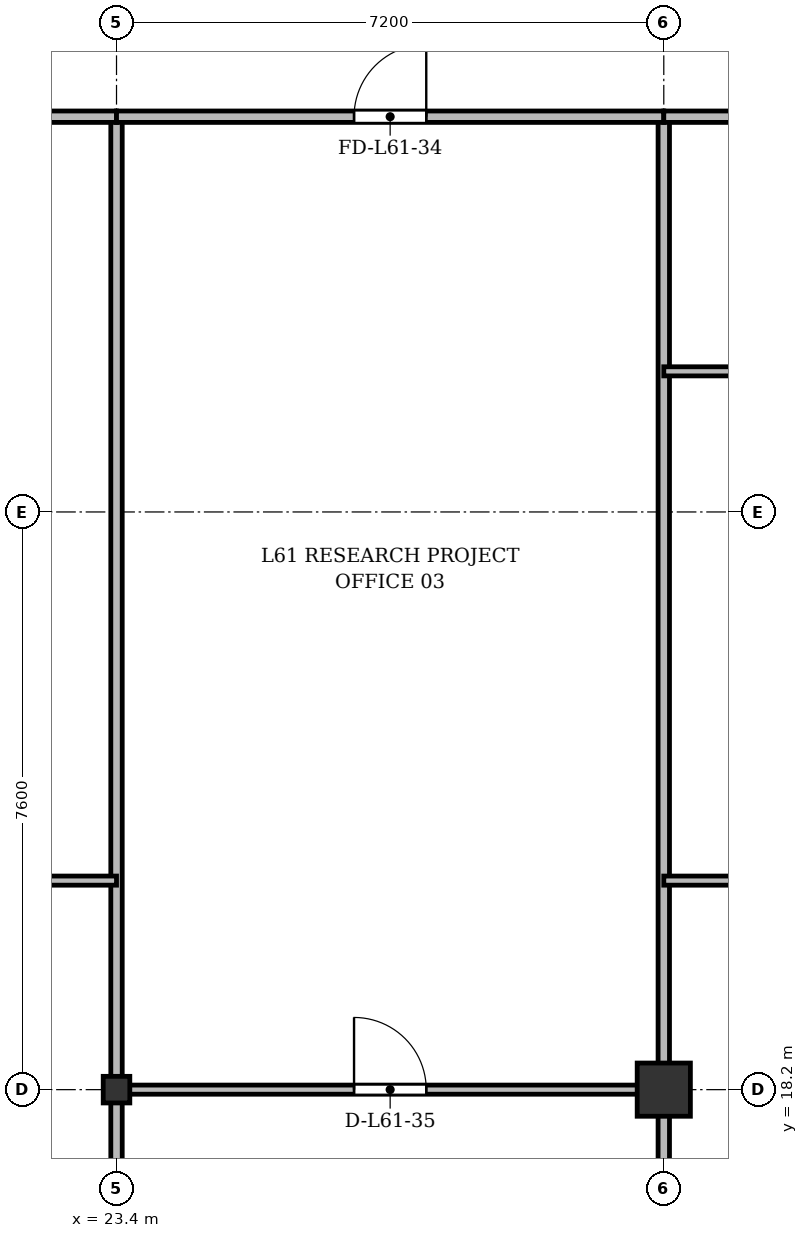
"""IFC4 building model, lengths in metres.
Left out: names, types, materials, properties, quantities, classifications, styles, units other than length and angle.
Written with IfcOpenShell. Run it as: python <this file> out.ifc"""

import sys

from ifc_helpers import new_model, si_unit, direction, frame, frame_2d, origin, origin_2d, place, context, subcontext, project, spatial, rectangle, i_section, extrude, source, transform, mapped, element, fill, save


model = new_model("IFC4")
c1 = context("Model", 3, precision=1e-05, world=origin(), true_north=direction((0.0, 1.0)))
c2 = subcontext(c1, "Body", "Model", "MODEL_VIEW")
j1 = project(units=[si_unit("LENGTHUNIT", "METRE"), si_unit("PLANEANGLEUNIT", "RADIAN")], contexts=[c1])
p1 = place(None, origin())
s1 = spatial("IfcSite", under=j1, at=p1, CompositionType="ELEMENT")
p2 = place(p1, origin())
s2 = spatial("IfcBuilding", under=s1, at=p2, CompositionType="ELEMENT")
p3 = place(p2, frame((0.0, 0.0, 233.7)))
s3 = spatial("IfcBuildingStorey", under=s2, at=p3, CompositionType="ELEMENT", Elevation=233.7)
m1 = source(origin(), c2, "Body", "SweptSolid", [
    extrude(i_section(OverallWidth=0.35, OverallDepth=0.35, WebThickness=0.018, FlangeThickness=0.028, at=origin_2d()), origin(), (0.0, 0.0, 1.0), 3.6),
])
p4 = place(p3, frame((23.4, 18.2, 0.0), z_axis=(0.0, 0.0, 1.0), x_axis=(1.0, 0.0, 0.0)))
e1 = element("IfcColumn", 1, at=p4, inside=s3, PredefinedType="COLUMN", context=c2, shape_type="MappedRepresentation", body=[
    mapped(m1, transform((0.0, 0.0, 0.0), x_axis=(1.0, 0.0, 0.0), y_axis=(0.0, 1.0, 0.0), z_axis=(0.0, 0.0, 1.0), scale=1.0)),
])
m2 = source(origin(), c2, "Body", "SweptSolid", [
    extrude(rectangle(XDim=0.7, YDim=0.7, at=origin_2d()), origin(), (0.0, 0.0, 1.0), 3.6),
])
p5 = place(p3, frame((30.6, 18.2, 0.0), z_axis=(0.0, 0.0, 1.0), x_axis=(1.0, 0.0, 0.0)))
e2 = element("IfcColumn", 2, at=p5, inside=s3, PredefinedType="COLUMN", context=c2, shape_type="MappedRepresentation", body=[
    mapped(m2, transform((0.0, 0.0, 0.0), x_axis=(1.0, 0.0, 0.0), y_axis=(0.0, 1.0, 0.0), z_axis=(0.0, 0.0, 1.0), scale=1.0)),
])
for number, where, z_axis, x_axis in (
    (3, (23.4, 3.625, 0.0), (0.0, 0.0, 1.0), (0.0, 1.0, 0.0)),
    (4, (30.6, 3.625, 0.0), (0.0, 0.0, 1.0), (0.0, 1.0, 0.0)),
):
    element("IfcWall", number, at=place(p3, frame(where, z_axis=z_axis, x_axis=x_axis)), inside=s3, PredefinedType="PARTITIONING", context=c2, shape_type="SweptSolid", body=[
        extrude(rectangle(XDim=27.375, YDim=0.15, at=frame_2d((13.688, 0.0))), origin(), (0.0, 0.0, 1.0), 2.86),
    ])
p6 = place(p3, frame((15.6, 20.95, 0.0), z_axis=(0.0, 0.0, 1.0), x_axis=(1.0, 0.0, 0.0)))
e5 = element("IfcWall", 5, at=p6, inside=s3, PredefinedType="PARTITIONING", context=c2, shape_type="SweptSolid", body=[
    extrude(rectangle(XDim=7.8, YDim=0.12, at=frame_2d((3.9, 0.0))), origin(), (0.0, 0.0, 1.0), 2.86),
])
p7 = place(p6, frame((3.333, 0.0, 0.0)))
e6 = element("IfcOpeningElement", 6, at=p7, cuts=e5, PredefinedType="OPENING", context=c2, shape_type="SweptSolid", body=[
    extrude(rectangle(XDim=0.95, YDim=2.15, at=frame_2d((0.475, 1.075))), frame((0.0, 0.07, 0.0), z_axis=(0.0, -1.0, 0.0), x_axis=(1.0, 0.0, 0.0)), (0.0, 0.0, 1.0), 0.14),
])
p8 = place(p3, frame((15.6, 31.0, 0.0), z_axis=(0.0, 0.0, 1.0), x_axis=(1.0, 0.0, 0.0)))
e7 = element("IfcWall", 7, at=p8, inside=s3, PredefinedType="PARTITIONING", context=c2, shape_type="SweptSolid", body=[
    extrude(rectangle(XDim=7.8, YDim=0.15, at=frame_2d((3.9, 0.0))), origin(), (0.0, 0.0, 1.0), 2.86),
])
p9 = place(p8, frame((5.172, 0.0, 0.0)))
e8 = element("IfcOpeningElement", 8, at=p9, cuts=e7, PredefinedType="OPENING", context=c2, shape_type="SweptSolid", body=[
    extrude(rectangle(XDim=0.95, YDim=2.15, at=frame_2d((0.475, 1.075))), frame((0.0, 0.085, 0.0), z_axis=(0.0, -1.0, 0.0), x_axis=(1.0, 0.0, 0.0)), (0.0, 0.0, 1.0), 0.17),
])
p10 = place(p3, frame((23.4, 31.0, 0.0), z_axis=(0.0, 0.0, 1.0), x_axis=(1.0, 0.0, 0.0)))
e9 = element("IfcWall", 9, at=p10, inside=s3, PredefinedType="PARTITIONING", context=c2, shape_type="SweptSolid", body=[
    extrude(rectangle(XDim=7.2, YDim=0.15, at=frame_2d((3.6, 0.0))), origin(), (0.0, 0.0, 1.0), 2.86),
])
p11 = place(p10, frame((3.125, 0.0, 0.0)))
e10 = element("IfcOpeningElement", 10, at=p11, cuts=e9, PredefinedType="OPENING", context=c2, shape_type="SweptSolid", body=[
    extrude(rectangle(XDim=0.95, YDim=2.15, at=frame_2d((0.475, 1.075))), frame((0.0, 0.085, 0.0), z_axis=(0.0, -1.0, 0.0), x_axis=(1.0, 0.0, 0.0)), (0.0, 0.0, 1.0), 0.17),
])
p12 = place(p3, frame((23.4, 18.2, 0.0), z_axis=(0.0, 0.0, 1.0), x_axis=(1.0, 0.0, 0.0)))
e11 = element("IfcWall", 11, at=p12, inside=s3, PredefinedType="PARTITIONING", context=c2, shape_type="SweptSolid", body=[
    extrude(rectangle(XDim=7.2, YDim=0.12, at=frame_2d((3.6, 0.0))), origin(), (0.0, 0.0, 1.0), 2.91),
])
p13 = place(p12, frame((3.125, 0.0, 0.0)))
e12 = element("IfcOpeningElement", 12, at=p13, cuts=e11, PredefinedType="OPENING", context=c2, shape_type="SweptSolid", body=[
    extrude(rectangle(XDim=0.95, YDim=2.15, at=frame_2d((0.475, 1.075))), frame((0.0, 0.07, 0.0), z_axis=(0.0, -1.0, 0.0), x_axis=(1.0, 0.0, 0.0)), (0.0, 0.0, 1.0), 0.14),
])
p14 = place(p3, frame((30.6, 20.95, 0.0), z_axis=(0.0, 0.0, 1.0), x_axis=(1.0, 0.0, 0.0)))
e13 = element("IfcWall", 13, at=p14, inside=s3, PredefinedType="PARTITIONING", context=c2, shape_type="SweptSolid", body=[
    extrude(rectangle(XDim=8.6, YDim=0.12, at=frame_2d((4.3, 0.0))), origin(), (0.0, 0.0, 1.0), 2.86),
])
p15 = place(p14, frame((3.825, 0.0, 0.0)))
e14 = element("IfcOpeningElement", 14, at=p15, cuts=e13, PredefinedType="OPENING", context=c2, shape_type="SweptSolid", body=[
    extrude(rectangle(XDim=0.95, YDim=2.15, at=frame_2d((0.475, 1.075))), frame((0.0, 0.07, 0.0), z_axis=(0.0, -1.0, 0.0), x_axis=(1.0, 0.0, 0.0)), (0.0, 0.0, 1.0), 0.14),
])
p16 = place(p3, frame((30.6, 27.65, 0.0), z_axis=(0.0, 0.0, 1.0), x_axis=(1.0, 0.0, 0.0)))
e15 = element("IfcWall", 15, at=p16, inside=s3, PredefinedType="PARTITIONING", context=c2, shape_type="SweptSolid", body=[
    extrude(rectangle(XDim=2.4, YDim=0.12, at=frame_2d((1.2, 0.0))), origin(), (0.0, 0.0, 1.0), 2.86),
])
p17 = place(p3, frame((30.6, 31.0, 0.0), z_axis=(0.0, 0.0, 1.0), x_axis=(1.0, 0.0, 0.0)))
e16 = element("IfcWall", 16, at=p17, inside=s3, PredefinedType="PARTITIONING", context=c2, shape_type="SweptSolid", body=[
    extrude(rectangle(XDim=8.6, YDim=0.15, at=frame_2d((4.3, 0.0))), origin(), (0.0, 0.0, 1.0), 2.86),
])
p18 = place(p17, frame((5.767, 0.0, 0.0)))
e17 = element("IfcOpeningElement", 17, at=p18, cuts=e16, PredefinedType="OPENING", context=c2, shape_type="SweptSolid", body=[
    extrude(rectangle(XDim=0.95, YDim=2.15, at=frame_2d((0.475, 1.075))), frame((0.0, 0.085, 0.0), z_axis=(0.0, -1.0, 0.0), x_axis=(1.0, 0.0, 0.0)), (0.0, 0.0, 1.0), 0.17),
])
m3 = source(origin(), c2, "Body", "SweptSolid", [
    extrude(rectangle(XDim=0.95, YDim=2.15, at=frame_2d((0.475, 1.075))), frame((0.0, 0.025, 0.0), z_axis=(0.0, -1.0, 0.0), x_axis=(1.0, 0.0, 0.0)), (0.0, 0.0, 1.0), 0.05),
])
p19 = place(p11, origin())
e18 = element("IfcDoor", 18, at=p19, inside=s3, OperationType="SINGLE_SWING_RIGHT", PredefinedType="DOOR", context=c2, shape_type="MappedRepresentation", body=[
    mapped(m3, transform((0.0, 0.0, 0.0), x_axis=(1.0, 0.0, 0.0), y_axis=(0.0, 1.0, 0.0), z_axis=(0.0, 0.0, 1.0), scale=1.0)),
])
fill(e10, e18)
p20 = place(p13, origin())
e19 = element("IfcDoor", 19, at=p20, inside=s3, OperationType="SINGLE_SWING_LEFT", PredefinedType="DOOR", context=c2, shape_type="MappedRepresentation", body=[
    mapped(m3, transform((0.0, 0.0, 0.0), x_axis=(1.0, 0.0, 0.0), y_axis=(0.0, 1.0, 0.0), z_axis=(0.0, 0.0, 1.0), scale=1.0)),
])
fill(e12, e19)
save(model, sys.argv[1])
